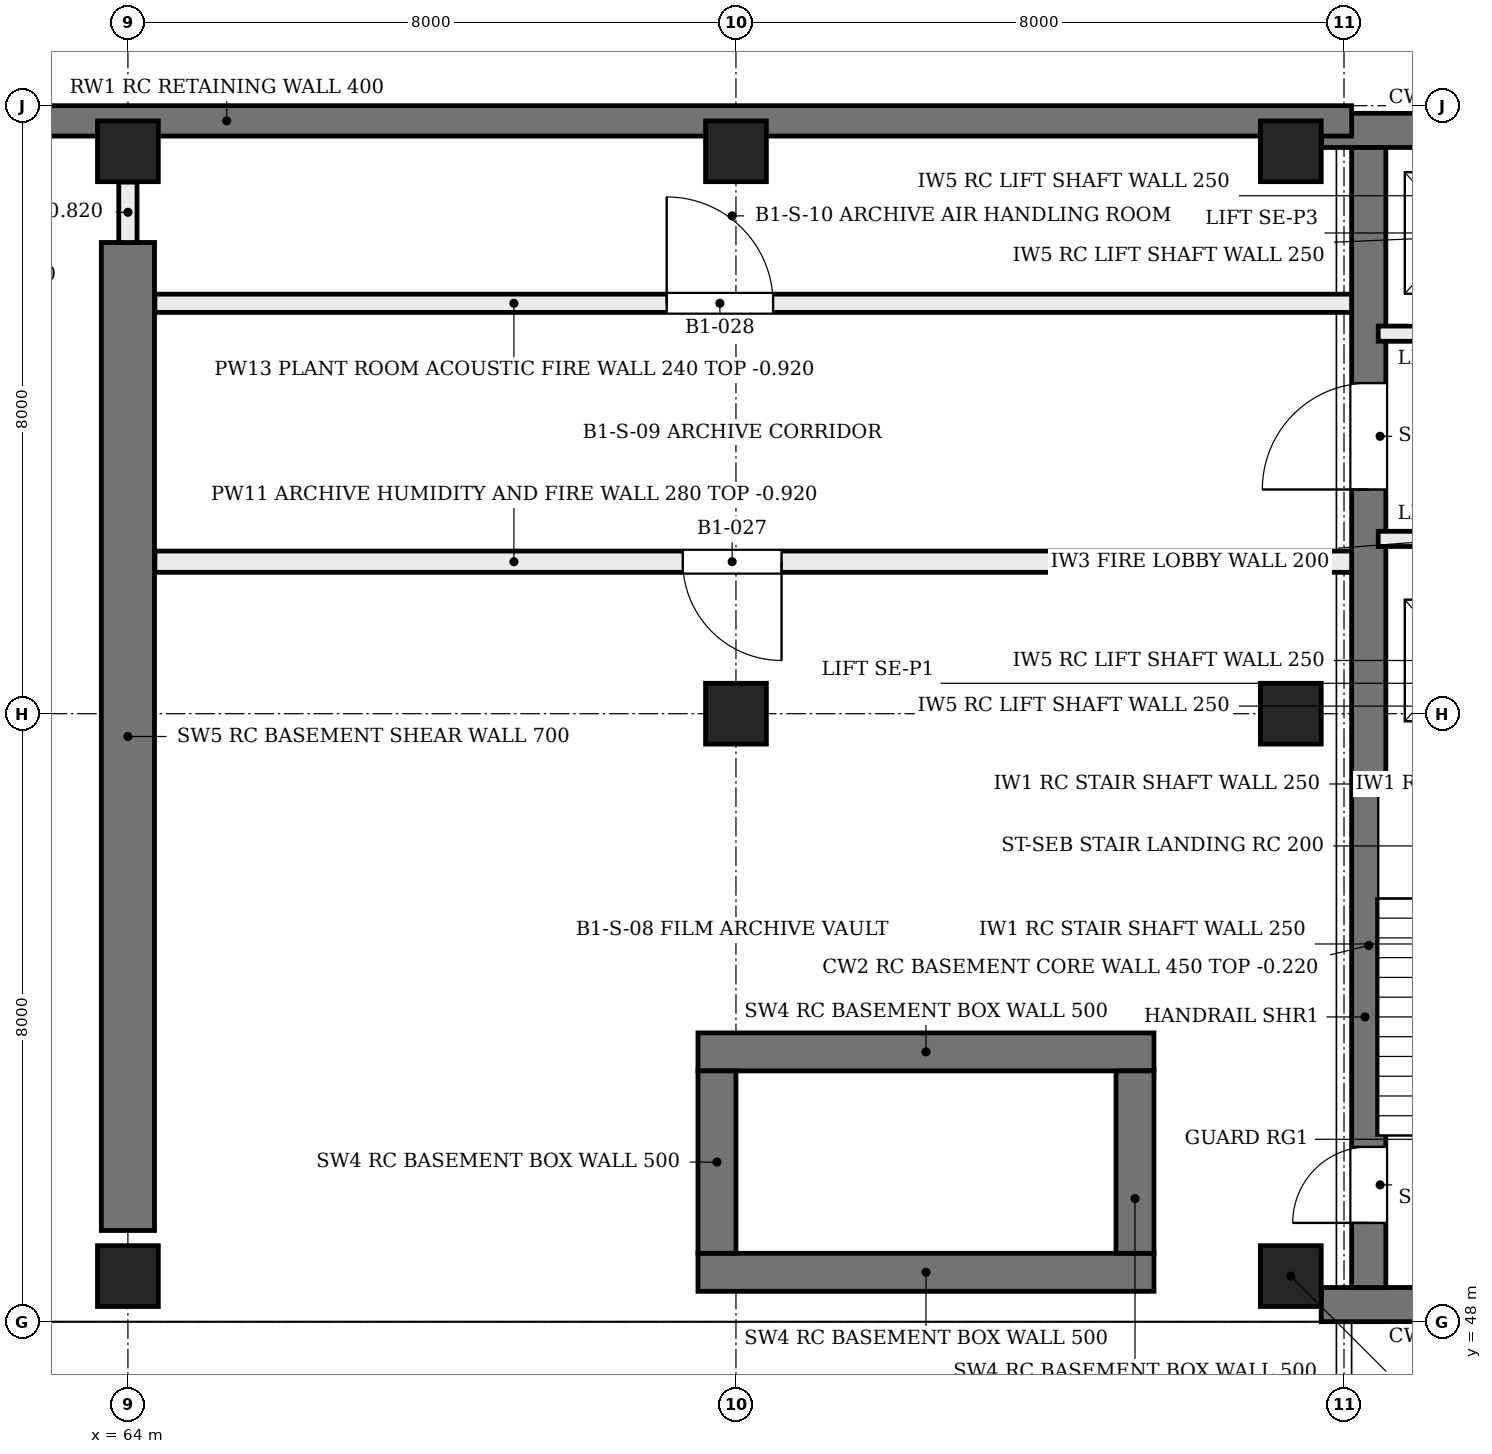
"""IFC4 building model, lengths in metres.
Left out: names, types, materials, properties, quantities, classifications, styles, units other than length and angle.
Written with IfcOpenShell. Run it as: python <this file> out.ifc"""

import sys

from ifc_helpers import new_model, si_unit, direction, frame, frame_2d, origin, origin_2d, place, context, subcontext, project, spatial, rectangle, extrude, element, fill, save


model = new_model("IFC4")
c1 = context("Model", 3, precision=1e-05, world=origin(), true_north=direction((0.0, 1.0)))
c2 = subcontext(c1, "Body", "Model", "MODEL_VIEW")
j1 = project(units=[si_unit("LENGTHUNIT", "METRE"), si_unit("PLANEANGLEUNIT", "RADIAN")], contexts=[c1])
p1 = place(None, origin())
s1 = spatial("IfcSite", under=j1, at=p1, CompositionType="ELEMENT")
p2 = place(p1, origin())
s2 = spatial("IfcBuilding", under=s1, at=p2, CompositionType="ELEMENT")
p3 = place(p2, frame((0.0, 0.0, -4.8)))
s3 = spatial("IfcBuildingStorey", under=s2, at=p3, CompositionType="ELEMENT", Elevation=-4.8)
for number, where, z_axis, x_axis in (
    (1, (71.5, 48.65, 0.0), (0.0, 0.0, 1.0), (1.0, 0.0, 0.0)),
    (2, (71.5, 51.55, 0.0), (0.0, 0.0, 1.0), (1.0, 0.0, 0.0)),
):
    element("IfcWall", number, at=place(p3, frame(where, z_axis=z_axis, x_axis=x_axis)), inside=s3, PredefinedType="SHEAR", context=c2, shape_type="SweptSolid", body=[
        extrude(rectangle(XDim=6.0, YDim=0.5, at=frame_2d((3.0, 0.0))), origin(), (0.0, 0.0, 1.0), 4.55),
    ])
for number, where, z_axis, x_axis in (
    (3, (71.75, 48.9, 0.0), (0.0, 0.0, 1.0), (0.0, 1.0, 0.0)),
    (4, (77.25, 48.9, 0.0), (0.0, 0.0, 1.0), (0.0, 1.0, 0.0)),
):
    element("IfcWall", number, at=place(p3, frame(where, z_axis=z_axis, x_axis=x_axis)), inside=s3, PredefinedType="SHEAR", context=c2, shape_type="SweptSolid", body=[
        extrude(rectangle(XDim=2.4, YDim=0.5, at=frame_2d((1.2, 0.0))), origin(), (0.0, 0.0, 1.0), 4.55),
    ])
p4 = place(p3, frame((64.0, 49.2, 0.0), z_axis=(0.0, 0.0, 1.0), x_axis=(0.0, 1.0, 0.0)))
e5 = element("IfcWall", 5, at=p4, inside=s3, PredefinedType="SHEAR", context=c2, shape_type="SweptSolid", body=[
    extrude(rectangle(XDim=13.0, YDim=0.7, at=frame_2d((6.5, 0.0))), origin(), (0.0, 0.0, 1.0), 4.55),
])
for number, where, z_axis, x_axis in (
    (6, (79.7, 48.225, 0.0), (0.0, 0.0, 1.0), (1.0, 0.0, 0.0)),
    (7, (79.7, 63.675, 0.0), (0.0, 0.0, 1.0), (1.0, 0.0, 0.0)),
):
    element("IfcWall", number, at=place(p3, frame(where, z_axis=z_axis, x_axis=x_axis)), inside=s3, PredefinedType="SHEAR", context=c2, shape_type="SweptSolid", body=[
        extrude(rectangle(XDim=8.3, YDim=0.45, at=frame_2d((4.15, 0.0))), origin(), (0.0, 0.0, 1.0), 4.58),
    ])
p5 = place(p3, frame((80.325, 48.45, 0.0), z_axis=(0.0, 0.0, 1.0), x_axis=(0.0, 1.0, 0.0)))
e8 = element("IfcWall", 8, at=p5, inside=s3, PredefinedType="SHEAR", context=c2, shape_type="SweptSolid", body=[
    extrude(rectangle(XDim=15.0, YDim=0.45, at=frame_2d((7.5, 0.0))), origin(), (0.0, 0.0, 1.0), 4.58),
])
p6 = place(p5, frame((0.85, 0.0, 0.0)))
e9 = element("IfcOpeningElement", 9, at=p6, cuts=e8, PredefinedType="OPENING", context=c2, shape_type="SweptSolid", body=[
    extrude(rectangle(XDim=1.0, YDim=2.1, at=frame_2d((0.5, 1.05))), frame((0.0, 0.235, 0.0), z_axis=(0.0, -1.0, 0.0), x_axis=(1.0, 0.0, 0.0)), (0.0, 0.0, 1.0), 0.47),
])
p7 = place(p5, frame((10.5, 0.0, 0.0)))
e10 = element("IfcOpeningElement", 10, at=p7, cuts=e8, PredefinedType="OPENING", context=c2, shape_type="SweptSolid", body=[
    extrude(rectangle(XDim=1.4, YDim=2.1, at=frame_2d((0.7, 1.05))), frame((0.0, 0.235, 0.0), z_axis=(0.0, -1.0, 0.0), x_axis=(1.0, 0.0, 0.0)), (0.0, 0.0, 1.0), 0.47),
])
for number, where, z_axis, x_axis in (
    (11, (64.0, 48.6, 0.0), (0.0, 0.0, 1.0), (1.0, 0.0, 0.0)),
    (12, (79.3, 48.6, 0.0), (0.0, 0.0, 1.0), (1.0, 0.0, 0.0)),
    (13, (72.0, 56.0, 0.0), (0.0, 0.0, 1.0), (1.0, 0.0, 0.0)),
    (14, (79.3, 56.0, 0.0), (0.0, 0.0, 1.0), (1.0, 0.0, 0.0)),
    (15, (64.0, 63.4, 0.0), (0.0, 0.0, 1.0), (1.0, 0.0, 0.0)),
    (16, (72.0, 63.4, 0.0), (0.0, 0.0, 1.0), (1.0, 0.0, 0.0)),
    (17, (79.3, 63.4, 0.0), (0.0, 0.0, 1.0), (1.0, 0.0, 0.0)),
):
    element("IfcColumn", number, at=place(p3, frame(where, z_axis=z_axis, x_axis=x_axis)), inside=s3, PredefinedType="COLUMN", context=c2, shape_type="SweptSolid", body=[
        extrude(rectangle(XDim=0.8, YDim=0.8, at=origin_2d()), origin(), (0.0, 0.0, 1.0), 4.58),
    ])
p8 = place(p3, frame((23.9, 63.8, 0.0), z_axis=(0.0, 0.0, 1.0), x_axis=(1.0, 0.0, 0.0)))
e18 = element("IfcWall", 18, at=p8, inside=s3, PredefinedType="SOLIDWALL", context=c2, shape_type="SweptSolid", body=[
    extrude(rectangle(XDim=56.2, YDim=0.4, at=frame_2d((28.1, 0.0))), origin(), (0.0, 0.0, 1.0), 4.55),
])
p9 = place(p3, frame((83.55, 55.075, 0.0), z_axis=(0.0, 0.0, 1.0), x_axis=(-1.0, 0.0, 0.0)))
e19 = element("IfcWall", 19, at=p9, inside=s3, PredefinedType="SOLIDWALL", context=c2, shape_type="SweptSolid", body=[
    extrude(rectangle(XDim=3.1, YDim=0.25, at=frame_2d((1.55, 0.0))), origin(), (0.0, 0.0, 1.0), 4.55),
])
p10 = place(p3, frame((87.65, 58.3, 0.0), z_axis=(0.0, 0.0, 1.0), x_axis=(-1.0, 0.0, 0.0)))
e20 = element("IfcWall", 20, at=p10, inside=s3, PredefinedType="SOLIDWALL", context=c2, shape_type="SweptSolid", body=[
    extrude(rectangle(XDim=7.2, YDim=0.2, at=frame_2d((3.6, 0.0))), origin(), (0.0, 0.0, 1.0), 4.55),
])
p11 = place(p10, frame((0.5, 0.0, 0.0)))
e21 = element("IfcOpeningElement", 21, at=p11, cuts=e20, PredefinedType="OPENING", context=c2, shape_type="SweptSolid", body=[
    extrude(rectangle(XDim=1.1, YDim=2.1, at=frame_2d((0.55, 1.05))), frame((0.0, 0.11, 0.0), z_axis=(0.0, -1.0, 0.0), x_axis=(1.0, 0.0, 0.0)), (0.0, 0.0, 1.0), 0.22),
])
p12 = place(p10, frame((5.6, 0.0, 0.0)))
e22 = element("IfcOpeningElement", 22, at=p12, cuts=e20, PredefinedType="OPENING", context=c2, shape_type="SweptSolid", body=[
    extrude(rectangle(XDim=1.1, YDim=2.1, at=frame_2d((0.55, 1.05))), frame((0.0, 0.11, 0.0), z_axis=(0.0, -1.0, 0.0), x_axis=(1.0, 0.0, 0.0)), (0.0, 0.0, 1.0), 0.22),
])
p13 = place(p10, frame((3.1, 0.0, 0.0)))
e23 = element("IfcOpeningElement", 23, at=p13, cuts=e20, PredefinedType="OPENING", context=c2, shape_type="SweptSolid", body=[
    extrude(rectangle(XDim=1.0, YDim=2.1, at=frame_2d((0.5, 1.05))), frame((0.0, 0.11, 0.0), z_axis=(0.0, -1.0, 0.0), x_axis=(1.0, 0.0, 0.0)), (0.0, 0.0, 1.0), 0.22),
])
p14 = place(p3, frame((87.65, 61.0, 0.0), z_axis=(0.0, 0.0, 1.0), x_axis=(-1.0, 0.0, 0.0)))
e24 = element("IfcWall", 24, at=p14, inside=s3, PredefinedType="SOLIDWALL", context=c2, shape_type="SweptSolid", body=[
    extrude(rectangle(XDim=7.2, YDim=0.2, at=frame_2d((3.6, 0.0))), origin(), (0.0, 0.0, 1.0), 4.55),
])
p15 = place(p14, frame((0.5, 0.0, 0.0)))
e25 = element("IfcOpeningElement", 25, at=p15, cuts=e24, PredefinedType="OPENING", context=c2, shape_type="SweptSolid", body=[
    extrude(rectangle(XDim=1.1, YDim=2.1, at=frame_2d((0.55, 1.05))), frame((0.0, 0.11, 0.0), z_axis=(0.0, -1.0, 0.0), x_axis=(1.0, 0.0, 0.0)), (0.0, 0.0, 1.0), 0.22),
])
p16 = place(p14, frame((5.6, 0.0, 0.0)))
e26 = element("IfcOpeningElement", 26, at=p16, cuts=e24, PredefinedType="OPENING", context=c2, shape_type="SweptSolid", body=[
    extrude(rectangle(XDim=1.1, YDim=2.1, at=frame_2d((0.55, 1.05))), frame((0.0, 0.11, 0.0), z_axis=(0.0, -1.0, 0.0), x_axis=(1.0, 0.0, 0.0)), (0.0, 0.0, 1.0), 0.22),
])
p17 = place(p14, frame((3.1, 0.0, 0.0)))
e27 = element("IfcOpeningElement", 27, at=p17, cuts=e24, PredefinedType="OPENING", context=c2, shape_type="SweptSolid", body=[
    extrude(rectangle(XDim=1.0, YDim=2.1, at=frame_2d((0.5, 1.05))), frame((0.0, 0.11, 0.0), z_axis=(0.0, -1.0, 0.0), x_axis=(1.0, 0.0, 0.0)), (0.0, 0.0, 1.0), 0.22),
])
p18 = place(p3, frame((64.0, 62.2, 0.0), z_axis=(0.0, 0.0, 1.0), x_axis=(0.0, 1.0, 0.0)))
e28 = element("IfcWall", 28, at=p18, inside=s3, PredefinedType="PARTITIONING", context=c2, shape_type="SweptSolid", body=[
    extrude(rectangle(XDim=0.795, YDim=0.24, at=frame_2d((0.397, 0.0))), origin(), (0.0, 0.0, 1.0), 3.98),
])
p19 = place(p3, frame((64.355, 58.0, 0.0), z_axis=(0.0, 0.0, 1.0), x_axis=(1.0, 0.0, 0.0)))
e29 = element("IfcWall", 29, at=p19, inside=s3, PredefinedType="PARTITIONING", context=c2, shape_type="SweptSolid", body=[
    extrude(rectangle(XDim=15.745, YDim=0.28, at=frame_2d((7.873, 0.0))), origin(), (0.0, 0.0, 1.0), 3.88),
])
p20 = place(p19, frame((6.945, 0.0, 0.0)))
e30 = element("IfcOpeningElement", 30, at=p20, cuts=e29, PredefinedType="OPENING", context=c2, shape_type="SweptSolid", body=[
    extrude(rectangle(XDim=1.3, YDim=2.4, at=frame_2d((0.65, 1.2))), frame((0.0, 0.15, 0.0), z_axis=(0.0, -1.0, 0.0), x_axis=(1.0, 0.0, 0.0)), (0.0, 0.0, 1.0), 0.3),
])
p21 = place(p3, frame((64.355, 61.4, 0.0), z_axis=(0.0, 0.0, 1.0), x_axis=(1.0, 0.0, 0.0)))
e31 = element("IfcWall", 31, at=p21, inside=s3, PredefinedType="PARTITIONING", context=c2, shape_type="SweptSolid", body=[
    extrude(rectangle(XDim=15.745, YDim=0.24, at=frame_2d((7.873, 0.0))), origin(), (0.0, 0.0, 1.0), 3.88),
])
p22 = place(p21, frame((6.733, 0.0, 0.0)))
e32 = element("IfcOpeningElement", 32, at=p22, cuts=e31, PredefinedType="OPENING", context=c2, shape_type="SweptSolid", body=[
    extrude(rectangle(XDim=1.4, YDim=2.4, at=frame_2d((0.7, 1.2))), frame((0.0, 0.13, 0.0), z_axis=(0.0, -1.0, 0.0), x_axis=(1.0, 0.0, 0.0)), (0.0, 0.0, 1.0), 0.26),
])
p23 = place(p6, origin())
e33 = element("IfcDoor", 33, at=p23, inside=s3, OperationType="SINGLE_SWING_LEFT", PredefinedType="DOOR", context=c2, shape_type="SweptSolid", body=[
    extrude(rectangle(XDim=1.0, YDim=2.1, at=frame_2d((0.5, 1.05))), frame((0.0, 0.025, 0.0), z_axis=(0.0, -1.0, 0.0), x_axis=(1.0, 0.0, 0.0)), (0.0, 0.0, 1.0), 0.05),
])
fill(e9, e33)
p24 = place(p7, origin())
e34 = element("IfcDoor", 34, at=p24, inside=s3, OperationType="SINGLE_SWING_LEFT", PredefinedType="DOOR", context=c2, shape_type="SweptSolid", body=[
    extrude(rectangle(XDim=1.4, YDim=2.1, at=frame_2d((0.7, 1.05))), frame((0.0, 0.025, 0.0), z_axis=(0.0, -1.0, 0.0), x_axis=(1.0, 0.0, 0.0)), (0.0, 0.0, 1.0), 0.05),
])
fill(e10, e34)
p25 = place(p20, origin())
e35 = element("IfcDoor", 35, at=p25, inside=s3, OperationType="SINGLE_SWING_RIGHT", PredefinedType="DOOR", context=c2, shape_type="SweptSolid", body=[
    extrude(rectangle(XDim=1.3, YDim=2.4, at=frame_2d((0.65, 1.2))), frame((0.0, 0.025, 0.0), z_axis=(0.0, -1.0, 0.0), x_axis=(1.0, 0.0, 0.0)), (0.0, 0.0, 1.0), 0.05),
])
fill(e30, e35)
p26 = place(p22, origin())
e36 = element("IfcDoor", 36, at=p26, inside=s3, OperationType="SINGLE_SWING_LEFT", PredefinedType="DOOR", context=c2, shape_type="SweptSolid", body=[
    extrude(rectangle(XDim=1.4, YDim=2.4, at=frame_2d((0.7, 1.2))), frame((0.0, 0.025, 0.0), z_axis=(0.0, -1.0, 0.0), x_axis=(1.0, 0.0, 0.0)), (0.0, 0.0, 1.0), 0.05),
])
fill(e32, e36)
save(model, sys.argv[1])
